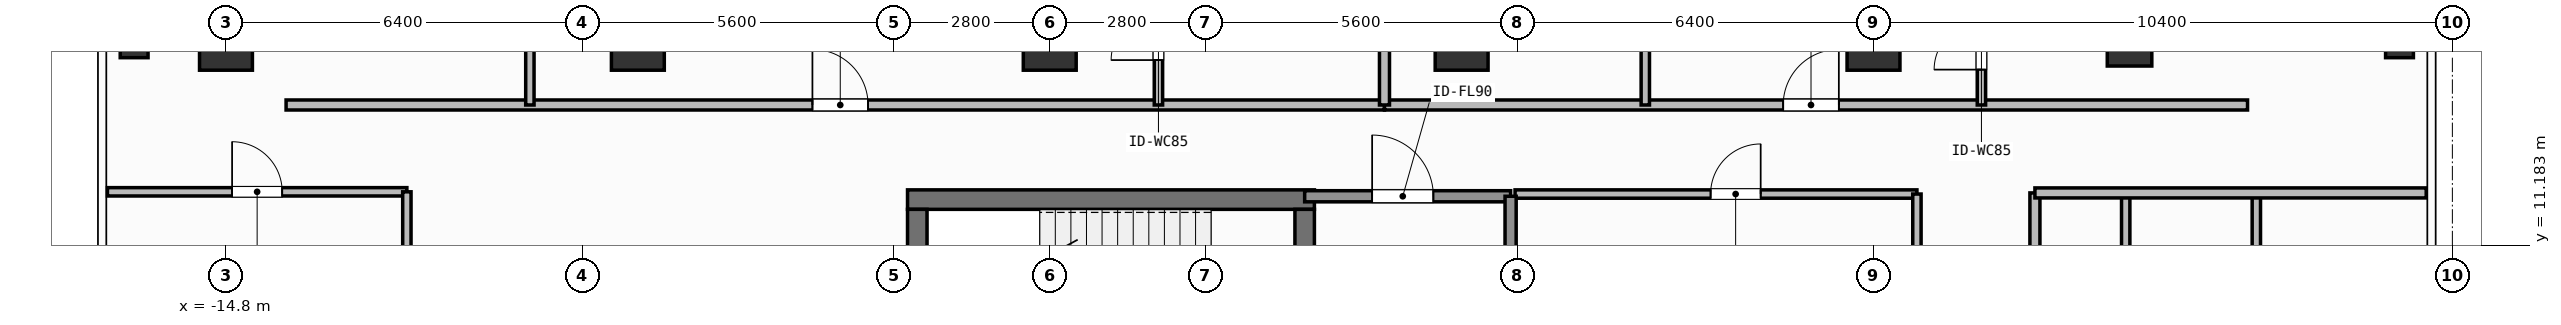
"""IFC4 building model, lengths in metres.
Left out: names, types, materials, properties, quantities, classifications, styles, units other than length and angle.
Written with IfcOpenShell. Run it as: python <this file> out.ifc"""

import sys

from ifc_helpers import new_model, si_unit, direction, frame, frame_2d, origin, origin_2d, place, context, subcontext, project, spatial, rectangle, hollow_rectangle, extrude, element, fill, save


model = new_model("IFC4")
c1 = context("Model", 3, precision=1e-05, world=origin(), true_north=direction((0.0, 1.0)))
c2 = subcontext(c1, "Body", "Model", "MODEL_VIEW")
j1 = project(units=[si_unit("LENGTHUNIT", "METRE"), si_unit("PLANEANGLEUNIT", "RADIAN")], contexts=[c1])
p1 = place(None, origin())
s1 = spatial("IfcSite", under=j1, at=p1, CompositionType="ELEMENT")
p2 = place(p1, origin())
s2 = spatial("IfcBuilding", under=s1, at=p2, CompositionType="ELEMENT")
p3 = place(p2, frame((0.0, 0.0, 282.0)))
s3 = spatial("IfcBuildingStorey", under=s2, at=p3, CompositionType="ELEMENT", Elevation=282.0)
p4 = place(p3, frame((-2.555, 12.0, 0.0), z_axis=(0.0, 0.0, 1.0), x_axis=(1.0, 0.0, 0.0)))
e1 = element("IfcWall", 1, at=p4, inside=s3, PredefinedType="SHEAR", context=c2, shape_type="SweptSolid", body=[
    extrude(rectangle(XDim=7.31, YDim=0.35, at=frame_2d((3.655, 0.0))), origin(), (0.0, 0.0, 1.0), 3.9),
])
p5 = place(p3, frame((-2.38, 8.9, 0.0), z_axis=(0.0, 0.0, 1.0), x_axis=(0.0, 1.0, 0.0)))
e2 = element("IfcWall", 2, at=p5, inside=s3, PredefinedType="SHEAR", context=c2, shape_type="SweptSolid", body=[
    extrude(rectangle(XDim=2.925, YDim=0.35, at=frame_2d((1.462, 0.0))), origin(), (0.0, 0.0, 1.0), 3.9),
])
p6 = place(p3, frame((4.58, 11.825, 0.0), z_axis=(0.0, 0.0, 1.0), x_axis=(0.0, -1.0, 0.0)))
e3 = element("IfcWall", 3, at=p6, inside=s3, PredefinedType="SHEAR", context=c2, shape_type="SweptSolid", body=[
    extrude(rectangle(XDim=2.925, YDim=0.35, at=frame_2d((1.462, 0.0))), origin(), (0.0, 0.0, 1.0), 3.9),
])
p7 = place(p6, frame((0.913, 0.0, 0.0)))
e4 = element("IfcOpeningElement", 4, at=p7, cuts=e3, PredefinedType="OPENING", context=c2, shape_type="SweptSolid", body=[
    extrude(rectangle(XDim=1.1, YDim=2.15, at=frame_2d((0.55, 1.075))), frame((0.0, 0.185, 0.0), z_axis=(0.0, -1.0, 0.0), x_axis=(1.0, 0.0, 0.0)), (0.0, 0.0, 1.0), 0.37),
])
for number, where, z_axis, x_axis in (
    (5, (-14.8, 14.8, 0.0), (0.0, 0.0, 1.0), (1.0, 0.0, 0.0)),
    (6, (-7.4, 14.8, 0.0), (0.0, 0.0, 1.0), (1.0, 0.0, 0.0)),
    (7, (0.0, 14.8, 0.0), (0.0, 0.0, 1.0), (1.0, 0.0, 0.0)),
    (8, (7.4, 14.8, 0.0), (0.0, 0.0, 1.0), (1.0, 0.0, 0.0)),
    (9, (14.8, 14.8, 0.0), (0.0, 0.0, 1.0), (1.0, 0.0, 0.0)),
):
    element("IfcColumn", number, at=place(p3, frame(where, z_axis=z_axis, x_axis=x_axis)), inside=s3, PredefinedType="COLUMN", context=c2, shape_type="SweptSolid", body=[
        extrude(rectangle(XDim=0.95, YDim=0.95, at=origin_2d()), origin(), (0.0, 0.0, 1.0), 3.9),
    ])
p8 = place(p3, frame((19.4, 14.8, 0.0), z_axis=(0.0, 0.0, 1.0), x_axis=(1.0, 0.0, 0.0)))
e10 = element("IfcColumn", 10, at=p8, inside=s3, PredefinedType="COLUMN", context=c2, shape_type="SweptSolid", body=[
    extrude(hollow_rectangle(XDim=0.8, YDim=0.8, WallThickness=0.036, at=origin_2d()), origin(), (0.0, 0.0, 1.0), 3.9),
])
for number, where, z_axis, x_axis in (
    (11, (-16.45, 14.8, 0.0), (0.0, 0.0, 1.0), (1.0, 0.0, 0.0)),
    (12, (24.25, 14.8, 0.0), (0.0, 0.0, 1.0), (1.0, 0.0, 0.0)),
):
    element("IfcColumn", number, at=place(p3, frame(where, z_axis=z_axis, x_axis=x_axis)), inside=s3, PredefinedType="COLUMN", context=c2, shape_type="SweptSolid", body=[
        extrude(hollow_rectangle(XDim=0.5, YDim=0.5, WallThickness=0.025, at=origin_2d()), origin(), (0.0, 0.0, 1.0), 3.9),
    ])
p9 = place(p3, frame((4.58, 12.06, 0.0), z_axis=(0.0, 0.0, 1.0), x_axis=(1.0, 0.0, 0.0)))
e13 = element("IfcWall", 13, at=p9, inside=s3, PredefinedType="SOLIDWALL", context=c2, shape_type="SweptSolid", body=[
    extrude(rectangle(XDim=3.7, YDim=0.2, at=frame_2d((1.85, 0.0))), origin(), (0.0, 0.0, 1.0), 3.62),
])
p10 = place(p9, frame((1.212, 0.0, 0.0)))
e14 = element("IfcOpeningElement", 14, at=p10, cuts=e13, PredefinedType="OPENING", context=c2, shape_type="SweptSolid", body=[
    extrude(rectangle(XDim=1.1, YDim=2.15, at=frame_2d((0.55, 1.075))), frame((0.0, 0.11, 0.0), z_axis=(0.0, -1.0, 0.0), x_axis=(1.0, 0.0, 0.0)), (0.0, 0.0, 1.0), 0.22),
])
p11 = place(p3, frame((8.36, 12.1, 0.0), z_axis=(0.0, 0.0, 1.0), x_axis=(1.0, 0.0, 0.0)))
e15 = element("IfcWall", 15, at=p11, inside=s3, PredefinedType="PARTITIONING", context=c2, shape_type="SweptSolid", body=[
    extrude(rectangle(XDim=7.22, YDim=0.15, at=frame_2d((3.61, 0.0))), origin(), (0.0, 0.0, 1.0), 3.62),
])
p12 = place(p11, frame((3.513, 0.0, 0.0)))
e16 = element("IfcOpeningElement", 16, at=p12, cuts=e15, PredefinedType="OPENING", context=c2, shape_type="SweptSolid", body=[
    extrude(rectangle(XDim=0.9, YDim=2.1, at=frame_2d((0.45, 1.05))), frame((0.0, 0.085, 0.0), z_axis=(0.0, -1.0, 0.0), x_axis=(1.0, 0.0, 0.0)), (0.0, 0.0, 1.0), 0.17),
])
p13 = place(p3, frame((-13.72, 13.7, 0.0), z_axis=(0.0, 0.0, 1.0), x_axis=(1.0, 0.0, 0.0)))
e17 = element("IfcWall", 17, at=p13, inside=s3, PredefinedType="PARTITIONING", context=c2, shape_type="SweptSolid", body=[
    extrude(rectangle(XDim=19.734, YDim=0.18, at=frame_2d((9.867, 0.0))), origin(), (0.0, 0.0, 1.0), 3.62),
])
p14 = place(p13, frame((9.456, 0.0, 0.0)))
e18 = element("IfcOpeningElement", 18, at=p14, cuts=e17, PredefinedType="OPENING", context=c2, shape_type="SweptSolid", body=[
    extrude(rectangle(XDim=1.0, YDim=2.2, at=frame_2d((0.5, 1.1))), frame((0.0, 0.1, 0.0), z_axis=(0.0, -1.0, 0.0), x_axis=(1.0, 0.0, 0.0)), (0.0, 0.0, 1.0), 0.2),
])
p15 = place(p3, frame((-9.34, 13.7, 0.0), z_axis=(0.0, 0.0, 1.0), x_axis=(0.0, 1.0, 0.0)))
e19 = element("IfcWall", 19, at=p15, inside=s3, PredefinedType="PARTITIONING", context=c2, shape_type="SweptSolid", body=[
    extrude(rectangle(XDim=4.11, YDim=0.15, at=frame_2d((2.055, 0.0))), origin(), (0.0, 0.0, 1.0), 3.62),
])
p16 = place(p15, frame((1.543, 0.0, 0.0)))
e20 = element("IfcOpeningElement", 20, at=p16, cuts=e19, PredefinedType="OPENING", context=c2, shape_type="SweptSolid", body=[
    extrude(rectangle(XDim=0.85, YDim=2.1, at=frame_2d((0.425, 1.05))), frame((0.0, 0.085, 0.0), z_axis=(0.0, -1.0, 0.0), x_axis=(1.0, 0.0, 0.0)), (0.0, 0.0, 1.0), 0.17),
])
p17 = place(p3, frame((1.953, 13.7, 0.0), z_axis=(0.0, 0.0, 1.0), x_axis=(0.0, 1.0, 0.0)))
e21 = element("IfcWall", 21, at=p17, inside=s3, PredefinedType="PARTITIONING", context=c2, shape_type="SweptSolid", body=[
    extrude(rectangle(XDim=2.302, YDim=0.15, at=frame_2d((1.151, 0.0))), origin(), (0.0, 0.0, 1.0), 3.62),
])
p18 = place(p17, frame((0.807, 0.0, 0.0)))
e22 = element("IfcOpeningElement", 22, at=p18, cuts=e21, PredefinedType="OPENING", context=c2, shape_type="SweptSolid", body=[
    extrude(rectangle(XDim=0.85, YDim=2.1, at=frame_2d((0.425, 1.05))), frame((0.0, 0.085, 0.0), z_axis=(0.0, -1.0, 0.0), x_axis=(1.0, 0.0, 0.0)), (0.0, 0.0, 1.0), 0.17),
])
p19 = place(p3, frame((6.014, 13.7, 0.0), z_axis=(0.0, 0.0, 1.0), x_axis=(1.0, 0.0, 0.0)))
e23 = element("IfcWall", 23, at=p19, inside=s3, PredefinedType="PARTITIONING", context=c2, shape_type="SweptSolid", body=[
    extrude(rectangle(XDim=15.506, YDim=0.18, at=frame_2d((7.753, 0.0))), origin(), (0.0, 0.0, 1.0), 3.62),
])
p20 = place(p19, frame((7.163, 0.0, 0.0)))
e24 = element("IfcOpeningElement", 24, at=p20, cuts=e23, PredefinedType="OPENING", context=c2, shape_type="SweptSolid", body=[
    extrude(rectangle(XDim=1.0, YDim=2.2, at=frame_2d((0.5, 1.1))), frame((0.0, 0.1, 0.0), z_axis=(0.0, -1.0, 0.0), x_axis=(1.0, 0.0, 0.0)), (0.0, 0.0, 1.0), 0.2),
])
p21 = place(p3, frame((10.7, 13.7, 0.0), z_axis=(0.0, 0.0, 1.0), x_axis=(0.0, 1.0, 0.0)))
e25 = element("IfcWall", 25, at=p21, inside=s3, PredefinedType="PARTITIONING", context=c2, shape_type="SweptSolid", body=[
    extrude(rectangle(XDim=3.787, YDim=0.15, at=frame_2d((1.894, 0.0))), origin(), (0.0, 0.0, 1.0), 3.62),
])
p22 = place(p21, frame((1.381, 0.0, 0.0)))
e26 = element("IfcOpeningElement", 26, at=p22, cuts=e25, PredefinedType="OPENING", context=c2, shape_type="SweptSolid", body=[
    extrude(rectangle(XDim=0.85, YDim=2.1, at=frame_2d((0.425, 1.05))), frame((0.0, 0.085, 0.0), z_axis=(0.0, -1.0, 0.0), x_axis=(1.0, 0.0, 0.0)), (0.0, 0.0, 1.0), 0.17),
])
p23 = place(p3, frame((16.739, 13.7, 0.0), z_axis=(0.0, 0.0, 1.0), x_axis=(0.0, 1.0, 0.0)))
e27 = element("IfcWall", 27, at=p23, inside=s3, PredefinedType="PARTITIONING", context=c2, shape_type="SweptSolid", body=[
    extrude(rectangle(XDim=2.121, YDim=0.15, at=frame_2d((1.061, 0.0))), origin(), (0.0, 0.0, 1.0), 3.62),
])
p24 = place(p23, frame((0.635, 0.0, 0.0)))
e28 = element("IfcOpeningElement", 28, at=p24, cuts=e27, PredefinedType="OPENING", context=c2, shape_type="SweptSolid", body=[
    extrude(rectangle(XDim=0.85, YDim=2.1, at=frame_2d((0.425, 1.05))), frame((0.0, 0.085, 0.0), z_axis=(0.0, -1.0, 0.0), x_axis=(1.0, 0.0, 0.0)), (0.0, 0.0, 1.0), 0.17),
])
p25 = place(p3, frame((-16.93, 12.14, 0.0), z_axis=(0.0, 0.0, 1.0), x_axis=(1.0, 0.0, 0.0)))
e29 = element("IfcWall", 29, at=p25, inside=s3, PredefinedType="PARTITIONING", context=c2, shape_type="SweptSolid", body=[
    extrude(rectangle(XDim=5.38, YDim=0.15, at=frame_2d((2.69, 0.0))), origin(), (0.0, 0.0, 1.0), 3.62),
])
p26 = place(p25, frame((2.24, 0.0, 0.0)))
e30 = element("IfcOpeningElement", 30, at=p26, cuts=e29, PredefinedType="OPENING", context=c2, shape_type="SweptSolid", body=[
    extrude(rectangle(XDim=0.9, YDim=2.1, at=frame_2d((0.45, 1.05))), frame((0.0, 0.085, 0.0), z_axis=(0.0, -1.0, 0.0), x_axis=(1.0, 0.0, 0.0)), (0.0, 0.0, 1.0), 0.17),
])
p27 = place(p3, frame((17.7, -12.12, 0.0), z_axis=(0.0, 0.0, 1.0), x_axis=(0.0, 1.0, 0.0)))
e31 = element("IfcWall", 31, at=p27, inside=s3, PredefinedType="PARTITIONING", context=c2, shape_type="SweptSolid", body=[
    extrude(rectangle(XDim=24.24, YDim=0.18, at=frame_2d((12.12, 0.0))), origin(), (0.0, 0.0, 1.0), 3.62),
])
p28 = place(p27, frame((11.62, 0.0, 0.0)))
e32 = element("IfcOpeningElement", 32, at=p28, cuts=e31, PredefinedType="OPENING", context=c2, shape_type="SweptSolid", body=[
    extrude(rectangle(XDim=1.0, YDim=2.2, at=frame_2d((0.5, 1.1))), frame((0.0, 0.1, 0.0), z_axis=(0.0, -1.0, 0.0), x_axis=(1.0, 0.0, 0.0)), (0.0, 0.0, 1.0), 0.2),
])
p29 = place(p3, frame((8.28, 8.725, 0.0), z_axis=(0.0, 0.0, 1.0), x_axis=(0.0, 1.0, 0.0)))
e33 = element("IfcWall", 33, at=p29, inside=s3, PredefinedType="SOLIDWALL", context=c2, shape_type="SweptSolid", body=[
    extrude(rectangle(XDim=3.335, YDim=0.2, at=frame_2d((1.667, 0.0))), origin(), (0.0, 0.0, 1.0), 3.62),
])
p30 = place(p3, frame((15.58, 5.85, 0.0), z_axis=(0.0, 0.0, 1.0), x_axis=(0.0, 1.0, 0.0)))
e34 = element("IfcWall", 34, at=p30, inside=s3, PredefinedType="PARTITIONING", context=c2, shape_type="SweptSolid", body=[
    extrude(rectangle(XDim=6.25, YDim=0.15, at=frame_2d((3.125, 0.0))), origin(), (0.0, 0.0, 1.0), 3.62),
])
p31 = place(p3, frame((6.014, 13.7, 0.0), z_axis=(0.0, 0.0, 1.0), x_axis=(0.0, 1.0, 0.0)))
e35 = element("IfcWall", 35, at=p31, inside=s3, PredefinedType="PARTITIONING", context=c2, shape_type="SweptSolid", body=[
    extrude(rectangle(XDim=7.33, YDim=0.18, at=frame_2d((3.665, 0.0))), origin(), (0.0, 0.0, 1.0), 3.62),
])
p32 = place(p3, frame((-11.55, 1.8, 0.0), z_axis=(0.0, 0.0, 1.0), x_axis=(0.0, 1.0, 0.0)))
e36 = element("IfcWall", 36, at=p32, inside=s3, PredefinedType="PARTITIONING", context=c2, shape_type="SweptSolid", body=[
    extrude(rectangle(XDim=10.34, YDim=0.15, at=frame_2d((5.17, 0.0))), origin(), (0.0, 0.0, 1.0), 3.62),
])
for number, where, z_axis, x_axis in (
    (37, (19.331, 5.431, 0.0), (0.0, 0.0, 1.0), (0.0, 1.0, 0.0)),
    (38, (21.678, 5.431, 0.0), (0.0, 0.0, 1.0), (0.0, 1.0, 0.0)),
):
    element("IfcWall", number, at=place(p3, frame(where, z_axis=z_axis, x_axis=x_axis)), inside=s3, PredefinedType="PARTITIONING", context=c2, shape_type="SweptSolid", body=[
        extrude(rectangle(XDim=6.689, YDim=0.15, at=frame_2d((3.345, 0.0))), origin(), (0.0, 0.0, 1.0), 3.62),
    ])
p33 = place(p3, frame((17.7, 12.12, 0.0), z_axis=(0.0, 0.0, 1.0), x_axis=(1.0, 0.0, 0.0)))
e39 = element("IfcWall", 39, at=p33, inside=s3, PredefinedType="PARTITIONING", context=c2, shape_type="SweptSolid", body=[
    extrude(rectangle(XDim=7.03, YDim=0.18, at=frame_2d((3.515, 0.0))), origin(), (0.0, 0.0, 1.0), 3.62),
])
p34 = place(p10, origin())
e40 = element("IfcDoor", 40, at=p34, inside=s3, OperationType="SINGLE_SWING_LEFT", PredefinedType="DOOR", context=c2, shape_type="SweptSolid", body=[
    extrude(rectangle(XDim=1.1, YDim=2.15, at=frame_2d((0.55, 1.075))), frame((0.0, 0.025, 0.0), z_axis=(0.0, -1.0, 0.0), x_axis=(1.0, 0.0, 0.0)), (0.0, 0.0, 1.0), 0.05),
])
fill(e14, e40)
p35 = place(p12, origin())
e41 = element("IfcDoor", 41, at=p35, inside=s3, OperationType="SINGLE_SWING_RIGHT", PredefinedType="DOOR", context=c2, shape_type="SweptSolid", body=[
    extrude(rectangle(XDim=0.9, YDim=2.1, at=frame_2d((0.45, 1.05))), frame((0.0, 0.025, 0.0), z_axis=(0.0, -1.0, 0.0), x_axis=(1.0, 0.0, 0.0)), (0.0, 0.0, 1.0), 0.05),
])
fill(e16, e41)
p36 = place(p14, origin())
e42 = element("IfcDoor", 42, at=p36, inside=s3, OperationType="SINGLE_SWING_LEFT", PredefinedType="DOOR", context=c2, shape_type="SweptSolid", body=[
    extrude(rectangle(XDim=1.0, YDim=2.2, at=frame_2d((0.5, 1.1))), frame((0.0, 0.025, 0.0), z_axis=(0.0, -1.0, 0.0), x_axis=(1.0, 0.0, 0.0)), (0.0, 0.0, 1.0), 0.05),
])
fill(e18, e42)
p37 = place(p18, origin())
e43 = element("IfcDoor", 43, at=p37, inside=s3, OperationType="SINGLE_SWING_LEFT", PredefinedType="DOOR", context=c2, shape_type="SweptSolid", body=[
    extrude(rectangle(XDim=0.85, YDim=2.1, at=frame_2d((0.425, 1.05))), frame((0.0, 0.025, 0.0), z_axis=(0.0, -1.0, 0.0), x_axis=(1.0, 0.0, 0.0)), (0.0, 0.0, 1.0), 0.05),
])
fill(e22, e43)
p38 = place(p20, origin())
e44 = element("IfcDoor", 44, at=p38, inside=s3, OperationType="SINGLE_SWING_RIGHT", PredefinedType="DOOR", context=c2, shape_type="SweptSolid", body=[
    extrude(rectangle(XDim=1.0, YDim=2.2, at=frame_2d((0.5, 1.1))), frame((0.0, 0.025, 0.0), z_axis=(0.0, -1.0, 0.0), x_axis=(1.0, 0.0, 0.0)), (0.0, 0.0, 1.0), 0.05),
])
fill(e24, e44)
p39 = place(p24, origin())
e45 = element("IfcDoor", 45, at=p39, inside=s3, OperationType="SINGLE_SWING_LEFT", PredefinedType="DOOR", context=c2, shape_type="SweptSolid", body=[
    extrude(rectangle(XDim=0.85, YDim=2.1, at=frame_2d((0.425, 1.05))), frame((0.0, 0.025, 0.0), z_axis=(0.0, -1.0, 0.0), x_axis=(1.0, 0.0, 0.0)), (0.0, 0.0, 1.0), 0.05),
])
fill(e28, e45)
p40 = place(p26, origin())
e46 = element("IfcDoor", 46, at=p40, inside=s3, OperationType="SINGLE_SWING_LEFT", PredefinedType="DOOR", context=c2, shape_type="SweptSolid", body=[
    extrude(rectangle(XDim=0.9, YDim=2.1, at=frame_2d((0.45, 1.05))), frame((0.0, 0.025, 0.0), z_axis=(0.0, -1.0, 0.0), x_axis=(1.0, 0.0, 0.0)), (0.0, 0.0, 1.0), 0.05),
])
fill(e30, e46)
save(model, sys.argv[1])
